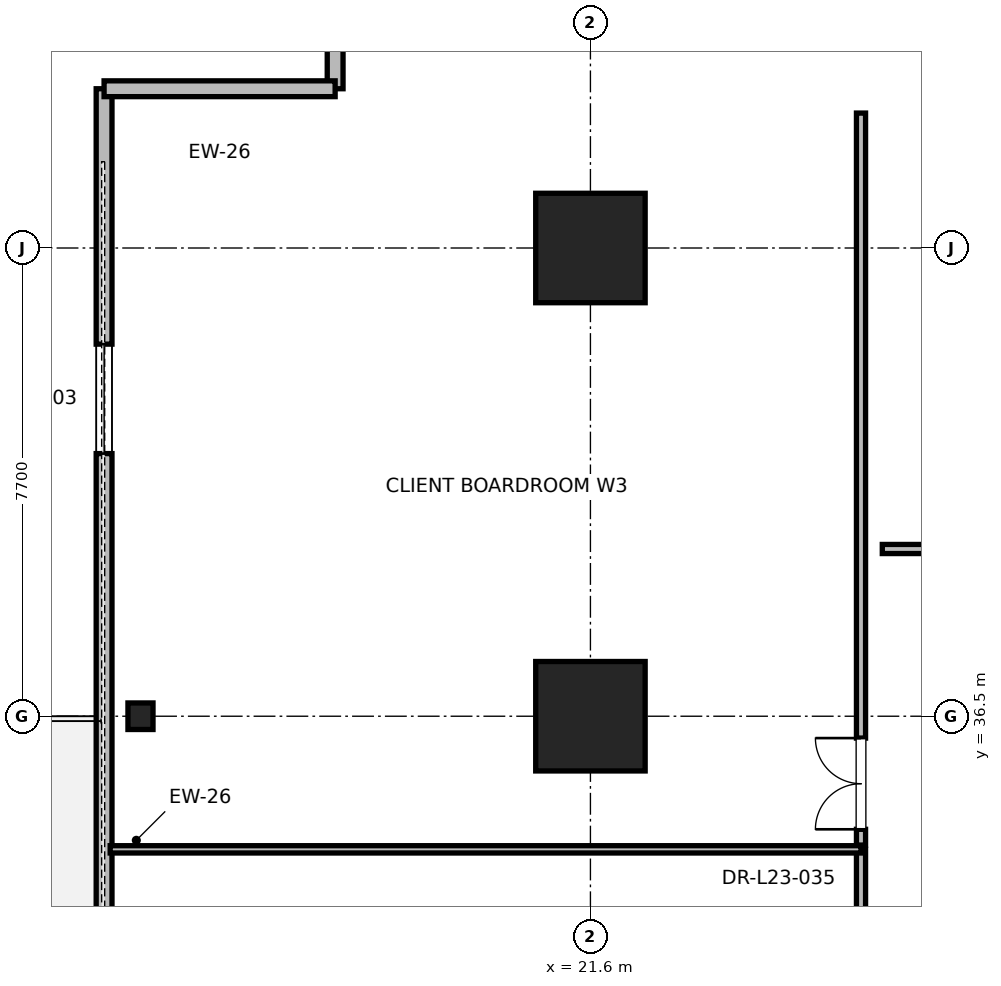
"""IFC4 building model, lengths in metres.
Left out: names, types, materials, properties, quantities, classifications, styles, units other than length and angle.
Written with IfcOpenShell. Run it as: python <this file> out.ifc"""

import sys

from ifc_helpers import new_model, si_unit, direction, frame, frame_2d, origin, origin_2d, place, context, subcontext, project, spatial, rectangle, i_section, extrude, element, fill, save


model = new_model("IFC4")
c1 = context("Model", 3, precision=1e-05, world=origin(), true_north=direction((0.0, 1.0)))
c2 = subcontext(c1, "Body", "Model", "MODEL_VIEW")
j1 = project(units=[si_unit("LENGTHUNIT", "METRE"), si_unit("PLANEANGLEUNIT", "RADIAN")], contexts=[c1])
p1 = place(None, origin())
s1 = spatial("IfcSite", under=j1, at=p1, CompositionType="ELEMENT")
p2 = place(p1, origin())
s2 = spatial("IfcBuilding", under=s1, at=p2, CompositionType="ELEMENT")
p3 = place(p2, frame((0.0, 0.0, 99.6)))
s3 = spatial("IfcBuildingStorey", under=s2, at=p3, CompositionType="ELEMENT", Elevation=99.6)
for number, where, z_axis, x_axis in (
    (1, (21.6, 36.5, 0.0), (0.0, 0.0, 1.0), (1.0, 0.0, 0.0)),
    (2, (21.6, 44.2, 0.0), (0.0, 0.0, 1.0), (1.0, 0.0, 0.0)),
):
    element("IfcColumn", number, at=place(p3, frame(where, z_axis=z_axis, x_axis=x_axis)), inside=s3, PredefinedType="COLUMN", context=c2, shape_type="SweptSolid", body=[
        extrude(rectangle(XDim=1.8, YDim=1.8, at=origin_2d()), origin(), (0.0, 0.0, 1.0), 4.0),
    ])
p4 = place(p3, frame((14.2, 36.5, 0.0), z_axis=(0.0, 0.0, 1.0), x_axis=(1.0, 0.0, 0.0)))
e3 = element("IfcColumn", 3, at=p4, inside=s3, PredefinedType="COLUMN", context=c2, shape_type="SweptSolid", body=[
    extrude(i_section(OverallWidth=0.412, OverallDepth=0.437, WebThickness=0.036, FlangeThickness=0.058, FilletRadius=0.015, at=origin_2d()), origin(), (0.0, 0.0, 1.0), 4.0),
])
p5 = place(p3, frame((13.601, 46.819, 0.0), z_axis=(0.0, 0.0, 1.0), x_axis=(0.0, -1.0, 0.0)))
e4 = element("IfcWall", 4, at=p5, inside=s3, PredefinedType="PARAPET", context=c2, shape_type="SweptSolid", body=[
    extrude(rectangle(XDim=38.638, YDim=0.26, at=frame_2d((19.319, 0.0))), origin(), (0.0, 0.0, 1.0), 3.273),
])
p6 = place(p5, frame((4.2, 0.0, 0.85)))
e5 = element("IfcOpeningElement", 5, at=p6, cuts=e4, PredefinedType="OPENING", context=c2, shape_type="SweptSolid", body=[
    extrude(rectangle(XDim=1.8, YDim=2.2, at=frame_2d((0.9, 1.1))), frame((0.0, 0.13, 0.0), z_axis=(0.0, -1.0, 0.0), x_axis=(1.0, 0.0, 0.0)), (0.0, 0.0, 1.0), 0.26),
])
p7 = place(p5, frame((18.719, 0.0, 0.0)))
e6 = element("IfcOpeningElement", 6, at=p7, cuts=e4, PredefinedType="OPENING", context=c2, shape_type="SweptSolid", body=[
    extrude(rectangle(XDim=1.2, YDim=2.2, at=frame_2d((0.6, 1.1))), frame((0.0, 0.13, 0.0), z_axis=(0.0, -1.0, 0.0), x_axis=(1.0, 0.0, 0.0)), (0.0, 0.0, 1.0), 0.26),
])
p8 = place(p5, frame((32.638, 0.0, 0.85)))
e7 = element("IfcOpeningElement", 7, at=p8, cuts=e4, PredefinedType="OPENING", context=c2, shape_type="SweptSolid", body=[
    extrude(rectangle(XDim=1.8, YDim=2.2, at=frame_2d((0.9, 1.1))), frame((0.0, 0.13, 0.0), z_axis=(0.0, -1.0, 0.0), x_axis=(1.0, 0.0, 0.0)), (0.0, 0.0, 1.0), 0.26),
])
p9 = place(p3, frame((17.401, 50.219, 0.0), z_axis=(0.0, 0.0, 1.0), x_axis=(0.0, -1.0, 0.0)))
e8 = element("IfcWall", 8, at=p9, inside=s3, PredefinedType="PARAPET", context=c2, shape_type="SweptSolid", body=[
    extrude(rectangle(XDim=3.4, YDim=0.26, at=frame_2d((1.7, 0.0))), origin(), (0.0, 0.0, 1.0), 3.76),
])
p10 = place(p9, frame((1.0, 0.0, 0.85)))
e9 = element("IfcOpeningElement", 9, at=p10, cuts=e8, PredefinedType="OPENING", context=c2, shape_type="SweptSolid", body=[
    extrude(rectangle(XDim=1.4, YDim=2.0, at=frame_2d((0.7, 1.0))), frame((0.0, 0.13, 0.0), z_axis=(0.0, -1.0, 0.0), x_axis=(1.0, 0.0, 0.0)), (0.0, 0.0, 1.0), 0.26),
])
p11 = place(p3, frame((17.401, 46.819, 0.0), z_axis=(0.0, 0.0, 1.0), x_axis=(-1.0, 0.0, 0.0)))
e10 = element("IfcWall", 10, at=p11, inside=s3, PredefinedType="PARAPET", context=c2, shape_type="SweptSolid", body=[
    extrude(rectangle(XDim=3.8, YDim=0.26, at=frame_2d((1.9, 0.0))), origin(), (0.0, 0.0, 1.0), 3.76),
])
p12 = place(p3, frame((26.4, 39.25, 0.0), z_axis=(0.0, 0.0, 1.0), x_axis=(1.0, 0.0, 0.0)))
e11 = element("IfcWall", 11, at=p12, inside=s3, PredefinedType="PARTITIONING", context=c2, shape_type="SweptSolid", body=[
    extrude(rectangle(XDim=8.976, YDim=0.15, at=frame_2d((4.488, 0.0))), origin(), (0.0, 0.0, 1.0), 2.85),
])
p13 = place(p12, frame((4.003, 0.0, 0.0)))
e12 = element("IfcOpeningElement", 12, at=p13, cuts=e11, PredefinedType="OPENING", context=c2, shape_type="SweptSolid", body=[
    extrude(rectangle(XDim=1.0, YDim=2.15, at=frame_2d((0.5, 1.075))), frame((0.0, 0.075, 0.0), z_axis=(0.0, -1.0, 0.0), x_axis=(1.0, 0.0, 0.0)), (0.0, 0.0, 1.0), 0.15),
])
p14 = place(p3, frame((26.05, 21.516, 0.0), z_axis=(0.0, 0.0, 1.0), x_axis=(0.0, 1.0, 0.0)))
e13 = element("IfcWall", 13, at=p14, inside=s3, PredefinedType="PARTITIONING", context=c2, shape_type="SweptSolid", body=[
    extrude(rectangle(XDim=12.795, YDim=0.15, at=frame_2d((6.397, 0.0))), origin(), (0.0, 0.0, 1.0), 2.85),
])
p15 = place(p14, frame((5.837, 0.0, 0.0)))
e14 = element("IfcOpeningElement", 14, at=p15, cuts=e13, PredefinedType="OPENING", context=c2, shape_type="SweptSolid", body=[
    extrude(rectangle(XDim=1.05, YDim=2.2, at=frame_2d((0.525, 1.1))), frame((0.0, 0.075, 0.0), z_axis=(0.0, -1.0, 0.0), x_axis=(1.0, 0.0, 0.0)), (0.0, 0.0, 1.0), 0.15),
])
p16 = place(p3, frame((13.701, 34.311, 0.0), z_axis=(0.0, 0.0, 1.0), x_axis=(1.0, 0.0, 0.0)))
e15 = element("IfcWall", 15, at=p16, inside=s3, PredefinedType="PARTITIONING", context=c2, shape_type="SweptSolid", body=[
    extrude(rectangle(XDim=12.349, YDim=0.12, at=frame_2d((6.174, 0.0))), origin(), (0.0, 0.0, 1.0), 2.85),
])
p17 = place(p3, frame((26.05, 34.381, 0.0), z_axis=(0.0, 0.0, 1.0), x_axis=(0.0, 1.0, 0.0)))
e16 = element("IfcWall", 16, at=p17, inside=s3, PredefinedType="PARTITIONING", context=c2, shape_type="SweptSolid", body=[
    extrude(rectangle(XDim=12.038, YDim=0.15, at=frame_2d((6.019, 0.0))), origin(), (0.0, 0.0, 1.0), 2.85),
])
p18 = place(p17, frame((0.26, 0.0, 0.0)))
e17 = element("IfcOpeningElement", 17, at=p18, cuts=e16, PredefinedType="OPENING", context=c2, shape_type="SweptSolid", body=[
    extrude(rectangle(XDim=1.5, YDim=2.25, at=frame_2d((0.75, 1.125))), frame((0.0, 0.075, 0.0), z_axis=(0.0, -1.0, 0.0), x_axis=(1.0, 0.0, 0.0)), (0.0, 0.0, 1.0), 0.15),
])
p19 = place(p6, origin())
e18 = element("IfcWindow", 18, at=p19, inside=s3, PartitioningType="SINGLE_PANEL", PredefinedType="WINDOW", context=c2, shape_type="SweptSolid", body=[
    extrude(rectangle(XDim=1.8, YDim=2.2, at=frame_2d((0.9, 1.1))), frame((0.0, 0.03, 0.0), z_axis=(0.0, -1.0, 0.0), x_axis=(1.0, 0.0, 0.0)), (0.0, 0.0, 1.0), 0.06),
])
fill(e5, e18)
p20 = place(p18, origin())
e19 = element("IfcDoor", 19, at=p20, inside=s3, OperationType="DOUBLE_DOOR_SINGLE_SWING", PredefinedType="DOOR", context=c2, shape_type="SweptSolid", body=[
    extrude(rectangle(XDim=1.5, YDim=2.25, at=frame_2d((0.75, 1.125))), frame((0.0, 0.025, 0.0), z_axis=(0.0, -1.0, 0.0), x_axis=(1.0, 0.0, 0.0)), (0.0, 0.0, 1.0), 0.05),
])
fill(e17, e19)
save(model, sys.argv[1])
